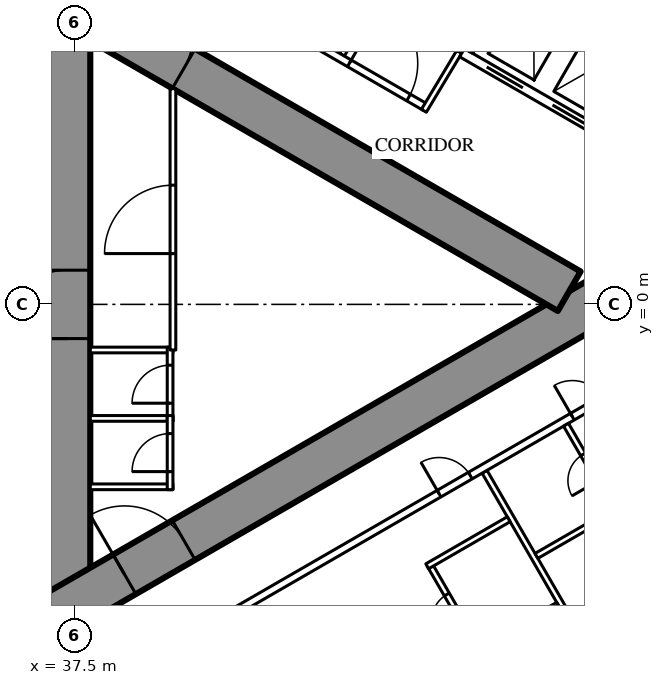
"""IFC4 building model, lengths in metres.
Left out: names, types, materials, properties, quantities, classifications, styles, units other than length and angle.
Written with IfcOpenShell. Run it as: python <this file> out.ifc"""

import sys

from ifc_helpers import new_model, si_unit, direction, frame, frame_2d, origin, place, context, subcontext, project, spatial, rectangle, extrude, element, fill, save


model = new_model("IFC4")
c1 = context("Model", 3, precision=1e-05, world=origin(), true_north=direction((0.0, 1.0)))
c2 = subcontext(c1, "Body", "Model", "MODEL_VIEW")
j1 = project(units=[si_unit("LENGTHUNIT", "METRE"), si_unit("PLANEANGLEUNIT", "RADIAN")], contexts=[c1])
p1 = place(None, origin())
s1 = spatial("IfcSite", under=j1, at=p1, CompositionType="ELEMENT")
p2 = place(p1, origin())
s2 = spatial("IfcBuilding", under=s1, at=p2, CompositionType="ELEMENT")
p3 = place(p2, frame((0.0, 0.0, 166.8)))
s3 = spatial("IfcBuildingStorey", under=s2, at=p3, CompositionType="ELEMENT", Elevation=166.8)
p4 = place(p3, frame((37.3, -8.6, 0.0), z_axis=(0.0, 0.0, 1.0), x_axis=(0.0, 1.0, 0.0)))
e1 = element("IfcWall", 1, at=p4, inside=s3, PredefinedType="SHEAR", context=c2, shape_type="SweptSolid", body=[
    extrude(rectangle(XDim=17.2, YDim=1.2, at=frame_2d((8.6, 0.0))), origin(), (0.0, 0.0, 1.0), 3.5),
])
p5 = place(p4, frame((7.7, 0.0, 0.0)))
e2 = element("IfcOpeningElement", 2, at=p5, cuts=e1, PredefinedType="OPENING", context=c2, shape_type="SweptSolid", body=[
    extrude(rectangle(XDim=1.8, YDim=2.2, at=frame_2d((0.9, 1.1))), frame((0.0, 0.61, 0.0), z_axis=(0.0, -1.0, 0.0), x_axis=(1.0, 0.0, 0.0)), (0.0, 0.0, 1.0), 1.22),
])
p6 = place(p3, frame((27.2, -13.8, 0.0), z_axis=(0.0, 0.0, 1.0), x_axis=(0.866027159892, 0.499996958321, 0.0)))
e3 = element("IfcWall", 3, at=p6, inside=s3, PredefinedType="SHEAR", context=c2, shape_type="SweptSolid", body=[
    extrude(rectangle(XDim=27.947, YDim=1.2, at=frame_2d((13.973, 0.0))), origin(), (0.0, 0.0, 1.0), 3.5),
])
p7 = place(p6, frame((4.6, 0.0, 0.0)))
e4 = element("IfcOpeningElement", 4, at=p7, cuts=e3, PredefinedType="OPENING", context=c2, shape_type="SweptSolid", body=[
    extrude(rectangle(XDim=1.0, YDim=2.2, at=frame_2d((0.5, 1.1))), frame((0.0, 0.61, 0.0), z_axis=(0.0, -1.0, 0.0), x_axis=(1.0, 0.0, 0.0)), (0.0, 0.0, 1.0), 1.22),
])
p8 = place(p6, frame((13.395, 0.0, 0.0)))
e5 = element("IfcOpeningElement", 5, at=p8, cuts=e3, PredefinedType="OPENING", context=c2, shape_type="SweptSolid", body=[
    extrude(rectangle(XDim=1.8, YDim=2.2, at=frame_2d((0.9, 1.1))), frame((0.0, 0.61, 0.0), z_axis=(0.0, -1.0, 0.0), x_axis=(1.0, 0.0, 0.0)), (0.0, 0.0, 1.0), 1.22),
])
p9 = place(p3, frame((27.2, 13.8, 0.0), z_axis=(0.0, 0.0, 1.0), x_axis=(0.866024515034, -0.500001539357, 0.0)))
e6 = element("IfcWall", 6, at=p9, inside=s3, PredefinedType="SHEAR", context=c2, shape_type="SweptSolid", body=[
    extrude(rectangle(XDim=26.907, YDim=1.2, at=frame_2d((13.454, 0.0))), origin(), (0.0, 0.0, 1.0), 3.5),
])
p10 = place(p9, frame((4.6, 0.0, 0.0)))
e7 = element("IfcOpeningElement", 7, at=p10, cuts=e6, PredefinedType="OPENING", context=c2, shape_type="SweptSolid", body=[
    extrude(rectangle(XDim=1.0, YDim=2.2, at=frame_2d((0.5, 1.1))), frame((0.0, 0.61, 0.0), z_axis=(0.0, -1.0, 0.0), x_axis=(1.0, 0.0, 0.0)), (0.0, 0.0, 1.0), 1.22),
])
p11 = place(p9, frame((13.395, 0.0, 0.0)))
e8 = element("IfcOpeningElement", 8, at=p11, cuts=e6, PredefinedType="OPENING", context=c2, shape_type="SweptSolid", body=[
    extrude(rectangle(XDim=1.8, YDim=2.2, at=frame_2d((0.9, 1.1))), frame((0.0, 0.61, 0.0), z_axis=(0.0, -1.0, 0.0), x_axis=(1.0, 0.0, 0.0)), (0.0, 0.0, 1.0), 1.22),
])
p12 = place(p3, frame((48.275, -4.404, 0.0), z_axis=(0.0, 0.0, 1.0), x_axis=(0.500006004368, -0.866021937133, 0.0)))
e9 = element("IfcWall", 9, at=p12, inside=s3, PredefinedType="PARTITIONING", context=c2, shape_type="SweptSolid", body=[
    extrude(rectangle(XDim=7.279, YDim=0.15, at=frame_2d((3.64, 0.0))), origin(), (0.0, 0.0, 1.0), 2.3),
])
p13 = place(p3, frame((44.521, 6.571, 0.0), z_axis=(0.0, 0.0, 1.0), x_axis=(0.500020376429, 0.866013639128, 0.0)))
e10 = element("IfcWall", 10, at=p13, inside=s3, PredefinedType="PARTITIONING", context=c2, shape_type="SweptSolid", body=[
    extrude(rectangle(XDim=7.306, YDim=0.15, at=frame_2d((3.653, 0.0))), origin(), (0.0, 0.0, 1.0), 2.3),
])
p14 = place(p3, frame((27.959, 16.017, 0.0), z_axis=(0.0, 0.0, 1.0), x_axis=(0.866027146794, -0.499996981007, 0.0)))
e11 = element("IfcWall", 11, at=p14, inside=s3, PredefinedType="PARTITIONING", context=c2, shape_type="SweptSolid", body=[
    extrude(rectangle(XDim=21.657, YDim=0.2, at=frame_2d((10.829, 0.0))), origin(), (0.0, 0.0, 1.0), 3.25),
])
p15 = place(p14, frame((15.391, 0.0, 0.0)))
e12 = element("IfcOpeningElement", 12, at=p15, cuts=e11, PredefinedType="OPENING", context=c2, shape_type="SweptSolid", body=[
    extrude(rectangle(XDim=0.95, YDim=2.2, at=frame_2d((0.475, 1.1))), frame((0.0, 0.11, 0.0), z_axis=(0.0, -1.0, 0.0), x_axis=(1.0, 0.0, 0.0)), (0.0, 0.0, 1.0), 0.22),
])
p16 = place(p14, frame((13.409, 0.0, 0.0)))
e13 = element("IfcOpeningElement", 13, at=p16, cuts=e11, PredefinedType="OPENING", context=c2, shape_type="SweptSolid", body=[
    extrude(rectangle(XDim=0.95, YDim=2.2, at=frame_2d((0.475, 1.1))), frame((0.0, 0.11, 0.0), z_axis=(0.0, -1.0, 0.0), x_axis=(1.0, 0.0, 0.0)), (0.0, 0.0, 1.0), 0.22),
])
p17 = place(p14, frame((0.6, 0.0, 0.0)))
e14 = element("IfcOpeningElement", 14, at=p17, cuts=e11, PredefinedType="OPENING", context=c2, shape_type="SweptSolid", body=[
    extrude(rectangle(XDim=0.95, YDim=2.2, at=frame_2d((0.475, 1.1))), frame((0.0, 0.11, 0.0), z_axis=(0.0, -1.0, 0.0), x_axis=(1.0, 0.0, 0.0)), (0.0, 0.0, 1.0), 0.22),
])
p18 = place(p14, frame((19.349, 0.0, 0.0)))
e15 = element("IfcOpeningElement", 15, at=p18, cuts=e11, PredefinedType="OPENING", context=c2, shape_type="SweptSolid", body=[
    extrude(rectangle(XDim=1.8, YDim=2.2, at=frame_2d((0.9, 1.1))), frame((0.0, 0.11, 0.0), z_axis=(0.0, -1.0, 0.0), x_axis=(1.0, 0.0, 0.0)), (0.0, 0.0, 1.0), 0.22),
])
p19 = place(p3, frame((47.606, 6.643, 0.0), z_axis=(0.0, 0.0, 1.0), x_axis=(-0.514237157483, -0.857648031458, 0.0)))
e16 = element("IfcWall", 16, at=p19, inside=s3, PredefinedType="PARTITIONING", context=c2, shape_type="SweptSolid", body=[
    extrude(rectangle(XDim=1.805, YDim=0.15, at=frame_2d((0.902, 0.0))), origin(), (0.0, 0.0, 1.0), 3.25),
])
p20 = place(p3, frame((40.741, -8.638, 0.0), z_axis=(0.0, 0.0, 1.0), x_axis=(0.866022967338, 0.500004220025, 0.0)))
e17 = element("IfcWall", 17, at=p20, inside=s3, PredefinedType="PARTITIONING", context=c2, shape_type="SweptSolid", body=[
    extrude(rectangle(XDim=17.276, YDim=0.2, at=frame_2d((8.638, 0.0))), origin(), (0.0, 0.0, 1.0), 3.25),
])
p21 = place(p20, frame((7.316, 0.0, 0.0)))
e18 = element("IfcOpeningElement", 18, at=p21, cuts=e17, PredefinedType="OPENING", context=c2, shape_type="SweptSolid", body=[
    extrude(rectangle(XDim=0.95, YDim=2.2, at=frame_2d((0.475, 1.1))), frame((0.0, 0.11, 0.0), z_axis=(0.0, -1.0, 0.0), x_axis=(1.0, 0.0, 0.0)), (0.0, 0.0, 1.0), 0.22),
])
p22 = place(p20, frame((11.366, 0.0, 0.0)))
e19 = element("IfcOpeningElement", 19, at=p22, cuts=e17, PredefinedType="OPENING", context=c2, shape_type="SweptSolid", body=[
    extrude(rectangle(XDim=0.95, YDim=2.2, at=frame_2d((0.475, 1.1))), frame((0.0, 0.11, 0.0), z_axis=(0.0, -1.0, 0.0), x_axis=(1.0, 0.0, 0.0)), (0.0, 0.0, 1.0), 0.22),
])
p23 = place(p20, frame((13.347, 0.0, 0.0)))
e20 = element("IfcOpeningElement", 20, at=p23, cuts=e17, PredefinedType="OPENING", context=c2, shape_type="SweptSolid", body=[
    extrude(rectangle(XDim=0.95, YDim=2.2, at=frame_2d((0.475, 1.1))), frame((0.0, 0.11, 0.0), z_axis=(0.0, -1.0, 0.0), x_axis=(1.0, 0.0, 0.0)), (0.0, 0.0, 1.0), 0.22),
])
p24 = place(p3, frame((48.066, -9.143, 0.0), z_axis=(0.0, 0.0, 1.0), x_axis=(0.866006523861, 0.500032699561, 0.0)))
e21 = element("IfcWall", 21, at=p24, inside=s3, PredefinedType="PARTITIONING", context=c2, shape_type="SweptSolid", body=[
    extrude(rectangle(XDim=2.475, YDim=0.15, at=frame_2d((1.237, 0.0))), origin(), (0.0, 0.0, 1.0), 3.25),
])
p25 = place(p3, frame((46.831, -6.854, 0.0), z_axis=(0.0, 0.0, 1.0), x_axis=(0.500006934395, -0.866021400173, 0.0)))
e22 = element("IfcWall", 22, at=p25, inside=s3, PredefinedType="PARTITIONING", context=c2, shape_type="SweptSolid", body=[
    extrude(rectangle(XDim=2.6, YDim=0.15, at=frame_2d((1.3, 0.0))), origin(), (0.0, 0.0, 1.0), 3.25),
])
p26 = place(p25, frame((0.9, 0.0, 0.0)))
e23 = element("IfcOpeningElement", 23, at=p26, cuts=e22, PredefinedType="OPENING", context=c2, shape_type="SweptSolid", body=[
    extrude(rectangle(XDim=0.8, YDim=2.2, at=frame_2d((0.4, 1.1))), frame((0.0, 0.085, 0.0), z_axis=(0.0, -1.0, 0.0), x_axis=(1.0, 0.0, 0.0)), (0.0, 0.0, 1.0), 0.17),
])
for number, where, z_axis, x_axis in (
    (24, (46.766, -6.891, 0.0), (0.0, 0.0, 1.0), (0.866, 0.5, 0.0)),
    (25, (49.64, -6.618, 0.0), (0.0, 0.0, 1.0), (0.866, 0.5, 0.0)),
):
    element("IfcWall", number, at=place(p3, frame(where, z_axis=z_axis, x_axis=x_axis)), inside=s3, PredefinedType="PARTITIONING", context=c2, shape_type="SweptSolid", body=[
        extrude(rectangle(XDim=2.475, YDim=0.15, at=frame_2d((1.237, 0.0))), origin(), (0.0, 0.0, 1.0), 3.25),
    ])
p27 = place(p3, frame((50.418, -3.166, 0.0), z_axis=(0.0, 0.0, 1.0), x_axis=(0.499936506574, -0.866062058628, 0.0)))
e26 = element("IfcWall", 26, at=p27, inside=s3, PredefinedType="PARTITIONING", context=c2, shape_type="SweptSolid", body=[
    extrude(rectangle(XDim=2.6, YDim=0.15, at=frame_2d((1.3, 0.0))), origin(), (0.0, 0.0, 1.0), 3.25),
])
p28 = place(p27, frame((0.9, 0.0, 0.0)))
e27 = element("IfcOpeningElement", 27, at=p28, cuts=e26, PredefinedType="OPENING", context=c2, shape_type="SweptSolid", body=[
    extrude(rectangle(XDim=0.8, YDim=2.2, at=frame_2d((0.4, 1.1))), frame((0.0, 0.085, 0.0), z_axis=(0.0, -1.0, 0.0), x_axis=(1.0, 0.0, 0.0)), (0.0, 0.0, 1.0), 0.17),
])
for number, where, z_axis, x_axis in (
    (28, (37.9, -1.2, 0.0), (0.0, 0.0, 1.0), (1.0, 0.0, 0.0)),
    (29, (37.9, -3.0, 0.0), (0.0, 0.0, 1.0), (1.0, 0.0, 0.0)),
    (30, (37.9, -4.8, 0.0), (0.0, 0.0, 1.0), (1.0, 0.0, 0.0)),
):
    element("IfcWall", number, at=place(p3, frame(where, z_axis=z_axis, x_axis=x_axis)), inside=s3, PredefinedType="PARTITIONING", context=c2, shape_type="SweptSolid", body=[
        extrude(rectangle(XDim=2.175, YDim=0.15, at=frame_2d((1.087, 0.0))), origin(), (0.0, 0.0, 1.0), 3.25),
    ])
p29 = place(p3, frame((40.0, -3.075, 0.0), z_axis=(0.0, 0.0, 1.0), x_axis=(0.0, 1.0, 0.0)))
e31 = element("IfcWall", 31, at=p29, inside=s3, PredefinedType="PARTITIONING", context=c2, shape_type="SweptSolid", body=[
    extrude(rectangle(XDim=1.95, YDim=0.15, at=frame_2d((0.975, 0.0))), origin(), (0.0, 0.0, 1.0), 3.25),
])
p30 = place(p29, frame((0.475, 0.0, 0.0)))
e32 = element("IfcOpeningElement", 32, at=p30, cuts=e31, PredefinedType="OPENING", context=c2, shape_type="SweptSolid", body=[
    extrude(rectangle(XDim=1.0, YDim=2.2, at=frame_2d((0.5, 1.1))), frame((0.0, 0.085, 0.0), z_axis=(0.0, -1.0, 0.0), x_axis=(1.0, 0.0, 0.0)), (0.0, 0.0, 1.0), 0.17),
])
p31 = place(p3, frame((40.0, -4.875, 0.0), z_axis=(0.0, 0.0, 1.0), x_axis=(0.0, 1.0, 0.0)))
e33 = element("IfcWall", 33, at=p31, inside=s3, PredefinedType="PARTITIONING", context=c2, shape_type="SweptSolid", body=[
    extrude(rectangle(XDim=1.95, YDim=0.15, at=frame_2d((0.975, 0.0))), origin(), (0.0, 0.0, 1.0), 3.25),
])
p32 = place(p31, frame((0.475, 0.0, 0.0)))
e34 = element("IfcOpeningElement", 34, at=p32, cuts=e33, PredefinedType="OPENING", context=c2, shape_type="SweptSolid", body=[
    extrude(rectangle(XDim=1.0, YDim=2.2, at=frame_2d((0.5, 1.1))), frame((0.0, 0.085, 0.0), z_axis=(0.0, -1.0, 0.0), x_axis=(1.0, 0.0, 0.0)), (0.0, 0.0, 1.0), 0.17),
])
p33 = place(p3, frame((40.075, -1.2, 0.0), z_axis=(0.0, 0.0, 1.0), x_axis=(0.0, 1.0, 0.0)))
e35 = element("IfcWall", 35, at=p33, inside=s3, PredefinedType="PARTITIONING", context=c2, shape_type="SweptSolid", body=[
    extrude(rectangle(XDim=6.874, YDim=0.15, at=frame_2d((3.437, 0.0))), origin(), (0.0, 0.0, 1.0), 3.25),
])
p34 = place(p33, frame((2.537, 0.0, 0.0)))
e36 = element("IfcOpeningElement", 36, at=p34, cuts=e35, PredefinedType="OPENING", context=c2, shape_type="SweptSolid", body=[
    extrude(rectangle(XDim=1.8, YDim=2.2, at=frame_2d((0.9, 1.1))), frame((0.0, 0.085, 0.0), z_axis=(0.0, -1.0, 0.0), x_axis=(1.0, 0.0, 0.0)), (0.0, 0.0, 1.0), 0.17),
])
p35 = place(p3, frame((47.681, 6.622, 0.0), z_axis=(0.0, 0.0, 1.0), x_axis=(0.86603344179, -0.499986077507, 0.0)))
e37 = element("IfcWall", 37, at=p35, inside=s3, PredefinedType="PARTITIONING", context=c2, shape_type="SweptSolid", body=[
    extrude(rectangle(XDim=6.6, YDim=0.25, at=frame_2d((3.3, 0.0))), origin(), (0.0, 0.0, 1.0), 3.25),
])
p36 = place(p35, frame((0.75, 0.0, 0.0)))
e38 = element("IfcOpeningElement", 38, at=p36, cuts=e37, PredefinedType="OPENING", context=c2, shape_type="SweptSolid", body=[
    extrude(rectangle(XDim=1.1, YDim=2.2, at=frame_2d((0.55, 1.1))), frame((0.0, 0.135, 0.0), z_axis=(0.0, -1.0, 0.0), x_axis=(1.0, 0.0, 0.0)), (0.0, 0.0, 1.0), 0.27),
])
p37 = place(p35, frame((2.75, 0.0, 0.0)))
e39 = element("IfcOpeningElement", 39, at=p37, cuts=e37, PredefinedType="OPENING", context=c2, shape_type="SweptSolid", body=[
    extrude(rectangle(XDim=1.1, YDim=2.2, at=frame_2d((0.55, 1.1))), frame((0.0, 0.135, 0.0), z_axis=(0.0, -1.0, 0.0), x_axis=(1.0, 0.0, 0.0)), (0.0, 0.0, 1.0), 0.27),
])
p38 = place(p35, frame((4.75, 0.0, 0.0)))
e40 = element("IfcOpeningElement", 40, at=p38, cuts=e37, PredefinedType="OPENING", context=c2, shape_type="SweptSolid", body=[
    extrude(rectangle(XDim=1.1, YDim=2.2, at=frame_2d((0.55, 1.1))), frame((0.0, 0.135, 0.0), z_axis=(0.0, -1.0, 0.0), x_axis=(1.0, 0.0, 0.0)), (0.0, 0.0, 1.0), 0.27),
])
p39 = place(p3, frame((49.406, 9.611, 0.0), z_axis=(0.0, 0.0, 1.0), x_axis=(0.86603344179, -0.499986077507, 0.0)))
e41 = element("IfcWall", 41, at=p39, inside=s3, PredefinedType="PARTITIONING", context=c2, shape_type="SweptSolid", body=[
    extrude(rectangle(XDim=6.6, YDim=0.25, at=frame_2d((3.3, 0.0))), origin(), (0.0, 0.0, 1.0), 3.25),
])
p40 = place(p3, frame((47.852, 6.668, 0.0), z_axis=(0.0, 0.0, 1.0), x_axis=(0.499929347863, 0.866066190972, 0.0)))
e42 = element("IfcWall", 42, at=p40, inside=s3, PredefinedType="PARTITIONING", context=c2, shape_type="SweptSolid", body=[
    extrude(rectangle(XDim=3.201, YDim=0.25, at=frame_2d((1.6, 0.0))), origin(), (0.0, 0.0, 1.0), 3.25),
])
p41 = place(p26, origin())
e43 = element("IfcDoor", 43, at=p41, inside=s3, OperationType="SINGLE_SWING_RIGHT", PredefinedType="DOOR", context=c2, shape_type="SweptSolid", body=[
    extrude(rectangle(XDim=0.8, YDim=2.2, at=frame_2d((0.4, 1.1))), frame((0.0, 0.025, 0.0), z_axis=(0.0, -1.0, 0.0), x_axis=(1.0, 0.0, 0.0)), (0.0, 0.0, 1.0), 0.05),
])
fill(e23, e43)
p42 = place(p21, origin())
e44 = element("IfcDoor", 44, at=p42, inside=s3, OperationType="SINGLE_SWING_LEFT", PredefinedType="DOOR", context=c2, shape_type="SweptSolid", body=[
    extrude(rectangle(XDim=0.95, YDim=2.2, at=frame_2d((0.475, 1.1))), frame((0.0, 0.025, 0.0), z_axis=(0.0, -1.0, 0.0), x_axis=(1.0, 0.0, 0.0)), (0.0, 0.0, 1.0), 0.05),
])
fill(e18, e44)
p43 = place(p28, origin())
e45 = element("IfcDoor", 45, at=p43, inside=s3, OperationType="SINGLE_SWING_RIGHT", PredefinedType="DOOR", context=c2, shape_type="SweptSolid", body=[
    extrude(rectangle(XDim=0.8, YDim=2.2, at=frame_2d((0.4, 1.1))), frame((0.0, 0.025, 0.0), z_axis=(0.0, -1.0, 0.0), x_axis=(1.0, 0.0, 0.0)), (0.0, 0.0, 1.0), 0.05),
])
fill(e27, e45)
p44 = place(p22, origin())
e46 = element("IfcDoor", 46, at=p44, inside=s3, OperationType="SINGLE_SWING_LEFT", PredefinedType="DOOR", context=c2, shape_type="SweptSolid", body=[
    extrude(rectangle(XDim=0.95, YDim=2.2, at=frame_2d((0.475, 1.1))), frame((0.0, 0.025, 0.0), z_axis=(0.0, -1.0, 0.0), x_axis=(1.0, 0.0, 0.0)), (0.0, 0.0, 1.0), 0.05),
])
fill(e19, e46)
p45 = place(p18, origin())
e47 = element("IfcDoor", 47, at=p45, inside=s3, OperationType="DOUBLE_DOOR_SINGLE_SWING", PredefinedType="DOOR", context=c2, shape_type="SweptSolid", body=[
    extrude(rectangle(XDim=1.8, YDim=2.2, at=frame_2d((0.9, 1.1))), frame((0.0, 0.025, 0.0), z_axis=(0.0, -1.0, 0.0), x_axis=(1.0, 0.0, 0.0)), (0.0, 0.0, 1.0), 0.05),
])
fill(e15, e47)
p46 = place(p30, origin())
e48 = element("IfcDoor", 48, at=p46, inside=s3, OperationType="SINGLE_SWING_LEFT", PredefinedType="DOOR", context=c2, shape_type="SweptSolid", body=[
    extrude(rectangle(XDim=1.0, YDim=2.2, at=frame_2d((0.5, 1.1))), frame((0.0, 0.025, 0.0), z_axis=(0.0, -1.0, 0.0), x_axis=(1.0, 0.0, 0.0)), (0.0, 0.0, 1.0), 0.05),
])
fill(e32, e48)
p47 = place(p32, origin())
e49 = element("IfcDoor", 49, at=p47, inside=s3, OperationType="SINGLE_SWING_LEFT", PredefinedType="DOOR", context=c2, shape_type="SweptSolid", body=[
    extrude(rectangle(XDim=1.0, YDim=2.2, at=frame_2d((0.5, 1.1))), frame((0.0, 0.025, 0.0), z_axis=(0.0, -1.0, 0.0), x_axis=(1.0, 0.0, 0.0)), (0.0, 0.0, 1.0), 0.05),
])
fill(e34, e49)
p48 = place(p34, origin())
e50 = element("IfcDoor", 50, at=p48, inside=s3, OperationType="DOUBLE_DOOR_SINGLE_SWING", PredefinedType="DOOR", context=c2, shape_type="SweptSolid", body=[
    extrude(rectangle(XDim=1.8, YDim=2.2, at=frame_2d((0.9, 1.1))), frame((0.0, 0.025, 0.0), z_axis=(0.0, -1.0, 0.0), x_axis=(1.0, 0.0, 0.0)), (0.0, 0.0, 1.0), 0.05),
])
fill(e36, e50)
p49 = place(p8, origin())
e51 = element("IfcDoor", 51, at=p49, inside=s3, OperationType="DOUBLE_DOOR_SINGLE_SWING", PredefinedType="DOOR", context=c2, shape_type="SweptSolid", body=[
    extrude(rectangle(XDim=1.8, YDim=2.2, at=frame_2d((0.9, 1.1))), frame((0.0, 0.025, 0.0), z_axis=(0.0, -1.0, 0.0), x_axis=(1.0, 0.0, 0.0)), (0.0, 0.0, 1.0), 0.05),
])
fill(e5, e51)
p50 = place(p11, origin())
e52 = element("IfcDoor", 52, at=p50, inside=s3, OperationType="DOUBLE_DOOR_SINGLE_SWING", PredefinedType="DOOR", context=c2, shape_type="SweptSolid", body=[
    extrude(rectangle(XDim=1.8, YDim=2.2, at=frame_2d((0.9, 1.1))), frame((0.0, 0.025, 0.0), z_axis=(0.0, -1.0, 0.0), x_axis=(1.0, 0.0, 0.0)), (0.0, 0.0, 1.0), 0.05),
])
fill(e8, e52)
p51 = place(p5, origin())
e53 = element("IfcDoor", 53, at=p51, inside=s3, OperationType="DOUBLE_DOOR_SINGLE_SWING", PredefinedType="DOOR", context=c2, shape_type="SweptSolid", body=[
    extrude(rectangle(XDim=1.8, YDim=2.2, at=frame_2d((0.9, 1.1))), frame((0.0, 0.025, 0.0), z_axis=(0.0, -1.0, 0.0), x_axis=(1.0, 0.0, 0.0)), (0.0, 0.0, 1.0), 0.05),
])
fill(e2, e53)
p52 = place(p36, origin())
e54 = element("IfcDoor", 54, at=p52, inside=s3, OperationType="DOUBLE_DOOR_SLIDING", PredefinedType="USERDEFINED", context=c2, shape_type="SweptSolid", body=[
    extrude(rectangle(XDim=1.1, YDim=2.2, at=frame_2d((0.55, 1.1))), frame((0.0, 0.025, 0.0), z_axis=(0.0, -1.0, 0.0), x_axis=(1.0, 0.0, 0.0)), (0.0, 0.0, 1.0), 0.05),
])
fill(e38, e54)
p53 = place(p37, origin())
e55 = element("IfcDoor", 55, at=p53, inside=s3, OperationType="DOUBLE_DOOR_SLIDING", PredefinedType="USERDEFINED", context=c2, shape_type="SweptSolid", body=[
    extrude(rectangle(XDim=1.1, YDim=2.2, at=frame_2d((0.55, 1.1))), frame((0.0, 0.025, 0.0), z_axis=(0.0, -1.0, 0.0), x_axis=(1.0, 0.0, 0.0)), (0.0, 0.0, 1.0), 0.05),
])
fill(e39, e55)
save(model, sys.argv[1])
